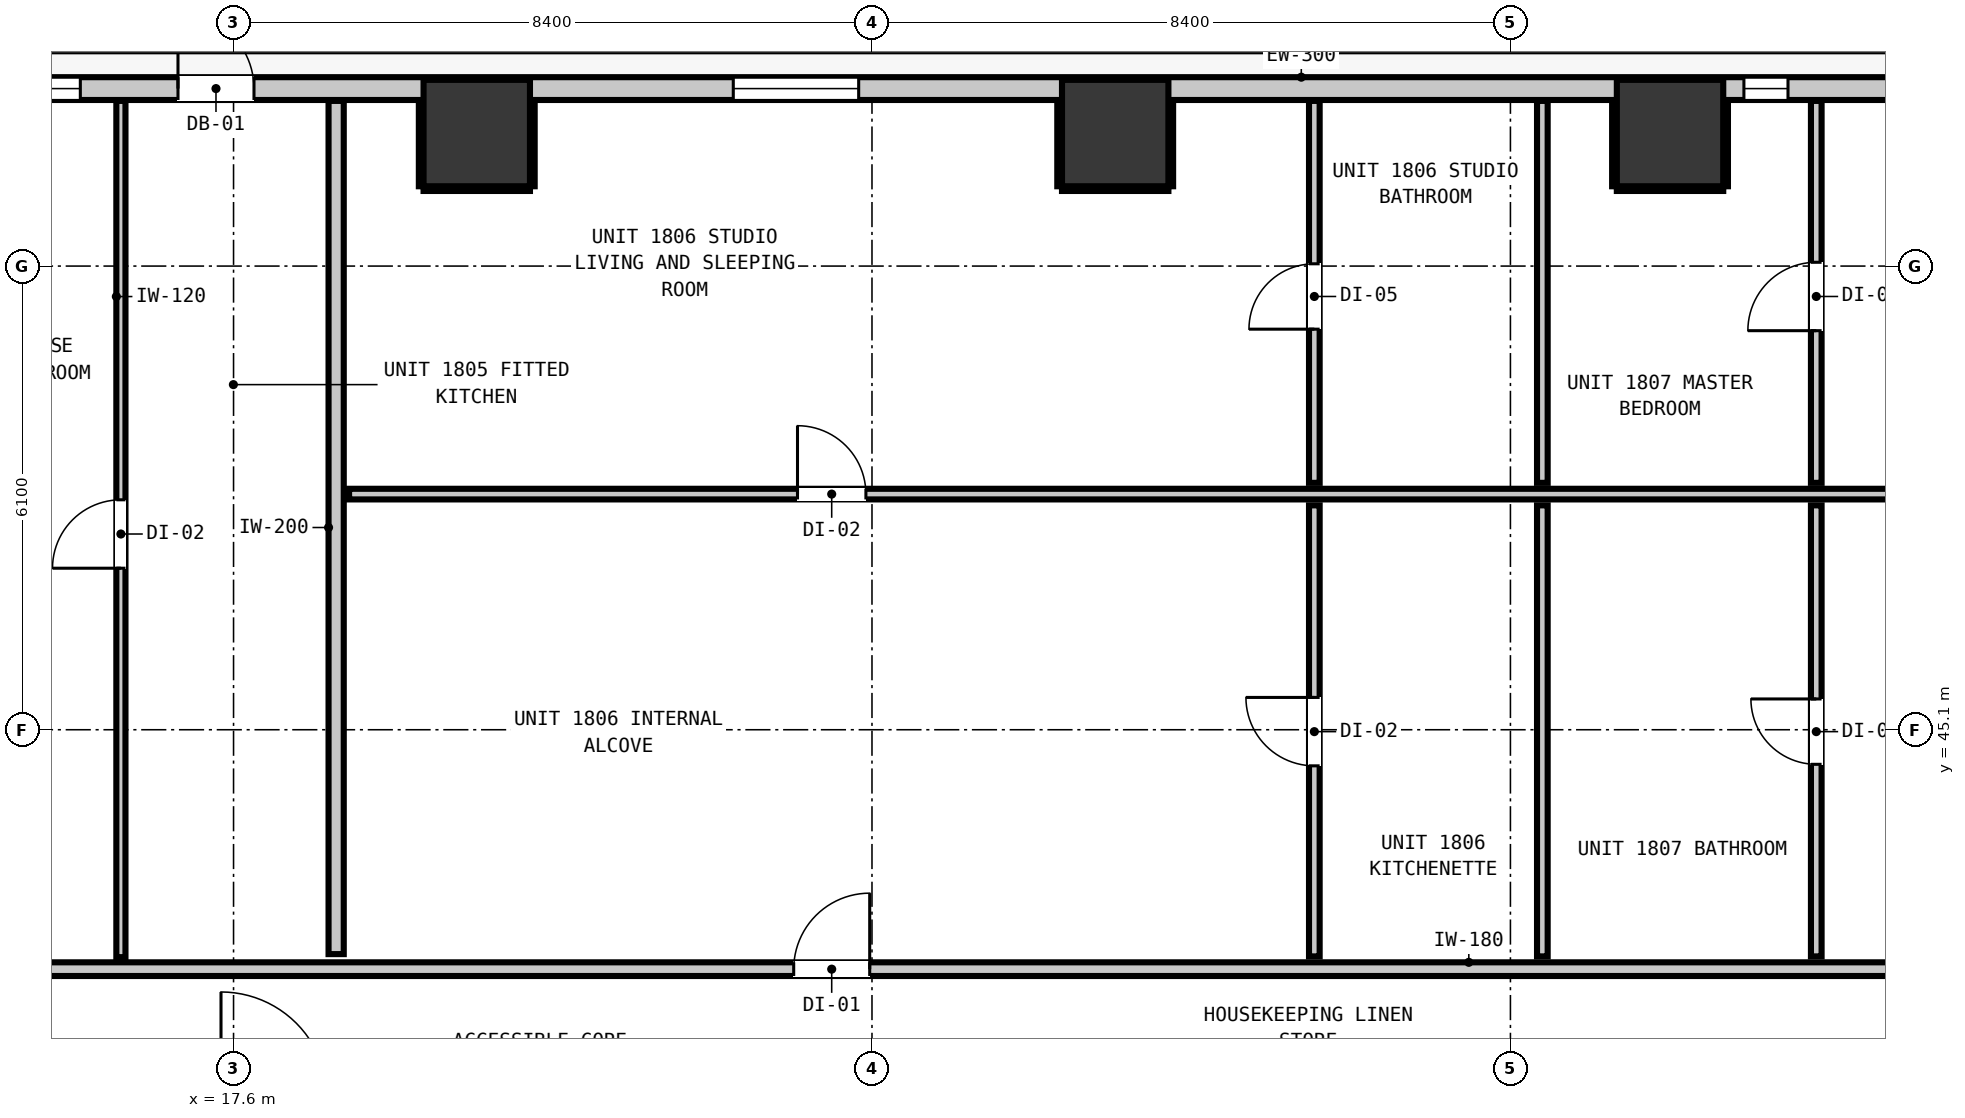
"""IFC4 building model, lengths in metres.
Left out: names, types, materials, properties, quantities, classifications, styles, units other than length and angle.
Written with IfcOpenShell. Run it as: python <this file> out.ifc"""

import sys

from ifc_helpers import new_model, si_unit, direction, frame, frame_2d, origin, origin_2d, place, context, subcontext, project, spatial, rectangle, extrude, element, fill, save


model = new_model("IFC4")
c1 = context("Model", 3, precision=1e-05, world=origin(), true_north=direction((0.0, 1.0)))
c2 = subcontext(c1, "Body", "Model", "MODEL_VIEW")
j1 = project(units=[si_unit("LENGTHUNIT", "METRE"), si_unit("PLANEANGLEUNIT", "RADIAN")], contexts=[c1])
p1 = place(None, origin())
s1 = spatial("IfcSite", under=j1, at=p1, CompositionType="ELEMENT")
p2 = place(p1, origin())
s2 = spatial("IfcBuilding", under=s1, at=p2, CompositionType="ELEMENT")
p3 = place(p2, frame((0.0, 0.0, 65.16)))
s3 = spatial("IfcBuildingStorey", under=s2, at=p3, CompositionType="ELEMENT", Elevation=65.16)
for number, where, z_axis, x_axis in (
    (1, (20.8, 52.95, 0.0), (0.0, 0.0, 1.0), (1.0, 0.0, 0.0)),
    (2, (29.2, 52.95, 0.0), (0.0, 0.0, 1.0), (1.0, 0.0, 0.0)),
    (3, (36.5, 52.95, 0.0), (0.0, 0.0, 1.0), (1.0, 0.0, 0.0)),
):
    element("IfcColumn", number, at=place(p3, frame(where, z_axis=z_axis, x_axis=x_axis)), inside=s3, PredefinedType="COLUMN", context=c2, shape_type="SweptSolid", body=[
        extrude(rectangle(XDim=1.4, YDim=1.4, at=origin_2d()), origin(), (0.0, 0.0, 1.0), 3.32),
    ])
p4 = place(p3, frame((10.365, 53.535, 0.0), z_axis=(0.0, 0.0, 1.0), x_axis=(1.0, 0.0, 0.0)))
e4 = element("IfcWall", 4, at=p4, inside=s3, PredefinedType="STANDARD", context=c2, shape_type="SweptSolid", body=[
    extrude(rectangle(XDim=37.47, YDim=0.3, at=frame_2d((18.735, 0.0))), origin(), (0.0, 0.0, 1.0), 3.06),
])
p5 = place(p4, frame((6.504, 0.0, 0.0)))
e5 = element("IfcOpeningElement", 5, at=p5, cuts=e4, PredefinedType="OPENING", context=c2, shape_type="SweptSolid", body=[
    extrude(rectangle(XDim=1.0, YDim=2.15, at=frame_2d((0.5, 1.075))), frame((0.0, 0.16, 0.0), z_axis=(0.0, -1.0, 0.0), x_axis=(1.0, 0.0, 0.0)), (0.0, 0.0, 1.0), 0.32),
])
p6 = place(p4, frame((4.169, 0.0, 0.85)))
e6 = element("IfcOpeningElement", 6, at=p6, cuts=e4, PredefinedType="OPENING", context=c2, shape_type="SweptSolid", body=[
    extrude(rectangle(XDim=1.05, YDim=1.65, at=frame_2d((0.525, 0.825))), frame((0.0, 0.16, 0.0), z_axis=(0.0, -1.0, 0.0), x_axis=(1.0, 0.0, 0.0)), (0.0, 0.0, 1.0), 0.32),
])
p7 = place(p4, frame((13.81, 0.0, 0.85)))
e7 = element("IfcOpeningElement", 7, at=p7, cuts=e4, PredefinedType="OPENING", context=c2, shape_type="SweptSolid", body=[
    extrude(rectangle(XDim=1.65, YDim=1.75, at=frame_2d((0.825, 0.875))), frame((0.0, 0.16, 0.0), z_axis=(0.0, -1.0, 0.0), x_axis=(1.0, 0.0, 0.0)), (0.0, 0.0, 1.0), 0.32),
])
p8 = place(p4, frame((31.046, 0.0, 0.85)))
e8 = element("IfcOpeningElement", 8, at=p8, cuts=e4, PredefinedType="OPENING", context=c2, shape_type="SweptSolid", body=[
    extrude(rectangle(XDim=1.65, YDim=1.75, at=frame_2d((0.825, 0.875))), frame((0.0, 0.16, 0.0), z_axis=(0.0, -1.0, 0.0), x_axis=(1.0, 0.0, 0.0)), (0.0, 0.0, 1.0), 0.32),
])
p9 = place(p4, frame((27.107, 0.0, 0.85)))
e9 = element("IfcOpeningElement", 9, at=p9, cuts=e4, PredefinedType="OPENING", context=c2, shape_type="SweptSolid", body=[
    extrude(rectangle(XDim=0.58, YDim=1.5, at=frame_2d((0.29, 0.75))), frame((0.0, 0.16, 0.0), z_axis=(0.0, -1.0, 0.0), x_axis=(1.0, 0.0, 0.0)), (0.0, 0.0, 1.0), 0.32),
])
p10 = place(p4, frame((36.056, 0.0, 0.85)))
e10 = element("IfcOpeningElement", 10, at=p10, cuts=e4, PredefinedType="OPENING", context=c2, shape_type="SweptSolid", body=[
    extrude(rectangle(XDim=1.05, YDim=1.65, at=frame_2d((0.525, 0.825))), frame((0.0, 0.16, 0.0), z_axis=(0.0, -1.0, 0.0), x_axis=(1.0, 0.0, 0.0)), (0.0, 0.0, 1.0), 0.32),
])
p11 = place(p3, frame((8.027, 41.95, 0.0), z_axis=(0.0, 0.0, 1.0), x_axis=(1.0, 0.0, 0.0)))
e11 = element("IfcWall", 11, at=p11, inside=s3, PredefinedType="PARTITIONING", context=c2, shape_type="SweptSolid", body=[
    extrude(rectangle(XDim=42.146, YDim=0.18, at=frame_2d((21.073, 0.0))), origin(), (0.0, 0.0, 1.0), 3.06),
])
p12 = place(p11, frame((5.255, 0.0, 0.0)))
e12 = element("IfcOpeningElement", 12, at=p12, cuts=e11, PredefinedType="OPENING", context=c2, shape_type="SweptSolid", body=[
    extrude(rectangle(XDim=1.0, YDim=2.15, at=frame_2d((0.5, 1.075))), frame((0.0, 0.1, 0.0), z_axis=(0.0, -1.0, 0.0), x_axis=(1.0, 0.0, 0.0)), (0.0, 0.0, 1.0), 0.2),
])
p13 = place(p11, frame((16.943, 0.0, 0.0)))
e13 = element("IfcOpeningElement", 13, at=p13, cuts=e11, PredefinedType="OPENING", context=c2, shape_type="SweptSolid", body=[
    extrude(rectangle(XDim=1.0, YDim=2.15, at=frame_2d((0.5, 1.075))), frame((0.0, 0.1, 0.0), z_axis=(0.0, -1.0, 0.0), x_axis=(1.0, 0.0, 0.0)), (0.0, 0.0, 1.0), 0.2),
])
p14 = place(p11, frame((33.708, 0.0, 0.0)))
e14 = element("IfcOpeningElement", 14, at=p14, cuts=e11, PredefinedType="OPENING", context=c2, shape_type="SweptSolid", body=[
    extrude(rectangle(XDim=1.0, YDim=2.15, at=frame_2d((0.5, 1.075))), frame((0.0, 0.1, 0.0), z_axis=(0.0, -1.0, 0.0), x_axis=(1.0, 0.0, 0.0)), (0.0, 0.0, 1.0), 0.2),
])
p15 = place(p3, frame((19.12, 48.2, 0.0), z_axis=(0.0, 0.0, 1.0), x_axis=(1.0, 0.0, 0.0)))
e15 = element("IfcWall", 15, at=p15, inside=s3, PredefinedType="PARTITIONING", context=c2, shape_type="SweptSolid", body=[
    extrude(rectangle(XDim=31.053, YDim=0.14, at=frame_2d((15.526, 0.0))), origin(), (0.0, 0.0, 1.0), 3.06),
])
p16 = place(p15, frame((5.9, 0.0, 0.0)))
e16 = element("IfcOpeningElement", 16, at=p16, cuts=e15, PredefinedType="OPENING", context=c2, shape_type="SweptSolid", body=[
    extrude(rectangle(XDim=0.9, YDim=2.1, at=frame_2d((0.45, 1.05))), frame((0.0, 0.08, 0.0), z_axis=(0.0, -1.0, 0.0), x_axis=(1.0, 0.0, 0.0)), (0.0, 0.0, 1.0), 0.16),
])
p17 = place(p15, frame((22.665, 0.0, 0.0)))
e17 = element("IfcOpeningElement", 17, at=p17, cuts=e15, PredefinedType="OPENING", context=c2, shape_type="SweptSolid", body=[
    extrude(rectangle(XDim=0.9, YDim=2.1, at=frame_2d((0.45, 1.05))), frame((0.0, 0.08, 0.0), z_axis=(0.0, -1.0, 0.0), x_axis=(1.0, 0.0, 0.0)), (0.0, 0.0, 1.0), 0.16),
])
p18 = place(p3, frame((18.95, 42.148, 0.0), z_axis=(0.0, 0.0, 1.0), x_axis=(0.0, 1.0, 0.0)))
e18 = element("IfcWall", 18, at=p18, inside=s3, PredefinedType="PARTITIONING", context=c2, shape_type="SweptSolid", body=[
    extrude(rectangle(XDim=11.225, YDim=0.2, at=frame_2d((5.613, 0.0))), origin(), (0.0, 0.0, 1.0), 3.06),
])
p19 = place(p3, frame((31.82, 42.118, 0.0), z_axis=(0.0, 0.0, 1.0), x_axis=(0.0, 1.0, 0.0)))
e19 = element("IfcWall", 19, at=p19, inside=s3, PredefinedType="PARTITIONING", context=c2, shape_type="SweptSolid", body=[
    extrude(rectangle(XDim=5.934, YDim=0.14, at=frame_2d((2.967, 0.0))), origin(), (0.0, 0.0, 1.0), 3.06),
])
p20 = place(p19, frame((2.507, 0.0, 0.0)))
e20 = element("IfcOpeningElement", 20, at=p20, cuts=e19, PredefinedType="OPENING", context=c2, shape_type="SweptSolid", body=[
    extrude(rectangle(XDim=0.9, YDim=2.1, at=frame_2d((0.45, 1.05))), frame((0.0, 0.08, 0.0), z_axis=(0.0, -1.0, 0.0), x_axis=(1.0, 0.0, 0.0)), (0.0, 0.0, 1.0), 0.16),
])
p21 = place(p3, frame((31.82, 48.348, 0.0), z_axis=(0.0, 0.0, 1.0), x_axis=(0.0, 1.0, 0.0)))
e21 = element("IfcWall", 21, at=p21, inside=s3, PredefinedType="PARTITIONING", context=c2, shape_type="SweptSolid", body=[
    extrude(rectangle(XDim=5.025, YDim=0.14, at=frame_2d((2.513, 0.0))), origin(), (0.0, 0.0, 1.0), 3.06),
])
p22 = place(p21, frame((2.022, 0.0, 0.0)))
e22 = element("IfcOpeningElement", 22, at=p22, cuts=e21, PredefinedType="OPENING", context=c2, shape_type="SweptSolid", body=[
    extrude(rectangle(XDim=0.86, YDim=2.02, at=frame_2d((0.43, 1.01))), frame((0.0, 0.08, 0.0), z_axis=(0.0, -1.0, 0.0), x_axis=(1.0, 0.0, 0.0)), (0.0, 0.0, 1.0), 0.16),
])
p23 = place(p3, frame((34.82, 42.118, 0.0), z_axis=(0.0, 0.0, 1.0), x_axis=(0.0, 1.0, 0.0)))
e23 = element("IfcWall", 23, at=p23, inside=s3, PredefinedType="PARTITIONING", context=c2, shape_type="SweptSolid", body=[
    extrude(rectangle(XDim=5.934, YDim=0.14, at=frame_2d((2.967, 0.0))), origin(), (0.0, 0.0, 1.0), 3.06),
])
p24 = place(p3, frame((34.82, 48.348, 0.0), z_axis=(0.0, 0.0, 1.0), x_axis=(0.0, 1.0, 0.0)))
e24 = element("IfcWall", 24, at=p24, inside=s3, PredefinedType="PARTITIONING", context=c2, shape_type="SweptSolid", body=[
    extrude(rectangle(XDim=5.025, YDim=0.14, at=frame_2d((2.513, 0.0))), origin(), (0.0, 0.0, 1.0), 3.06),
])
p25 = place(p3, frame((38.424, 42.118, 0.0), z_axis=(0.0, 0.0, 1.0), x_axis=(0.0, 1.0, 0.0)))
e25 = element("IfcWall", 25, at=p25, inside=s3, PredefinedType="PARTITIONING", context=c2, shape_type="SweptSolid", body=[
    extrude(rectangle(XDim=5.934, YDim=0.14, at=frame_2d((2.967, 0.0))), origin(), (0.0, 0.0, 1.0), 3.06),
])
p26 = place(p25, frame((2.527, 0.0, 0.0)))
e26 = element("IfcOpeningElement", 26, at=p26, cuts=e25, PredefinedType="OPENING", context=c2, shape_type="SweptSolid", body=[
    extrude(rectangle(XDim=0.86, YDim=2.02, at=frame_2d((0.43, 1.01))), frame((0.0, 0.08, 0.0), z_axis=(0.0, -1.0, 0.0), x_axis=(1.0, 0.0, 0.0)), (0.0, 0.0, 1.0), 0.16),
])
p27 = place(p3, frame((38.424, 48.348, 0.0), z_axis=(0.0, 0.0, 1.0), x_axis=(0.0, 1.0, 0.0)))
e27 = element("IfcWall", 27, at=p27, inside=s3, PredefinedType="PARTITIONING", context=c2, shape_type="SweptSolid", body=[
    extrude(rectangle(XDim=5.025, YDim=0.14, at=frame_2d((2.513, 0.0))), origin(), (0.0, 0.0, 1.0), 3.06),
])
p28 = place(p27, frame((2.002, 0.0, 0.0)))
e28 = element("IfcOpeningElement", 28, at=p28, cuts=e27, PredefinedType="OPENING", context=c2, shape_type="SweptSolid", body=[
    extrude(rectangle(XDim=0.9, YDim=2.1, at=frame_2d((0.45, 1.05))), frame((0.0, 0.08, 0.0), z_axis=(0.0, -1.0, 0.0), x_axis=(1.0, 0.0, 0.0)), (0.0, 0.0, 1.0), 0.16),
])
p29 = place(p3, frame((16.118, 42.108, 0.0), z_axis=(0.0, 0.0, 1.0), x_axis=(0.0, 1.0, 0.0)))
e29 = element("IfcWall", 29, at=p29, inside=s3, PredefinedType="PARTITIONING", context=c2, shape_type="SweptSolid", body=[
    extrude(rectangle(XDim=11.265, YDim=0.12, at=frame_2d((5.633, 0.0))), origin(), (0.0, 0.0, 1.0), 3.06),
])
p30 = place(p29, frame((5.117, 0.0, 0.0)))
e30 = element("IfcOpeningElement", 30, at=p30, cuts=e29, PredefinedType="OPENING", context=c2, shape_type="SweptSolid", body=[
    extrude(rectangle(XDim=0.9, YDim=2.1, at=frame_2d((0.45, 1.05))), frame((0.0, 0.07, 0.0), z_axis=(0.0, -1.0, 0.0), x_axis=(1.0, 0.0, 0.0)), (0.0, 0.0, 1.0), 0.14),
])
p31 = place(p3, frame((20.1, 52.218, 0.0), z_axis=(0.0, 0.0, 1.0), x_axis=(1.0, 0.0, 0.0)))
e31 = element("IfcWall", 31, at=p31, inside=s3, PredefinedType="PARTITIONING", context=c2, shape_type="SweptSolid", body=[
    extrude(rectangle(XDim=1.4, YDim=0.06, at=frame_2d((0.7, 0.0))), origin(), (0.0, 0.0, 1.0), 1.45),
])
for number, where, z_axis, x_axis in (
    (32, (20.068, 52.25, 0.0), (0.0, 0.0, 1.0), (0.0, 1.0, 0.0)),
    (33, (21.532, 52.25, 0.0), (0.0, 0.0, 1.0), (0.0, 1.0, 0.0)),
):
    element("IfcWall", number, at=place(p3, frame(where, z_axis=z_axis, x_axis=x_axis)), inside=s3, PredefinedType="PARTITIONING", context=c2, shape_type="SweptSolid", body=[
        extrude(rectangle(XDim=1.12, YDim=0.06, at=frame_2d((0.56, 0.0))), origin(), (0.0, 0.0, 1.0), 1.45),
    ])
p32 = place(p3, frame((28.5, 52.218, 0.0), z_axis=(0.0, 0.0, 1.0), x_axis=(1.0, 0.0, 0.0)))
e34 = element("IfcWall", 34, at=p32, inside=s3, PredefinedType="PARTITIONING", context=c2, shape_type="SweptSolid", body=[
    extrude(rectangle(XDim=1.4, YDim=0.06, at=frame_2d((0.7, 0.0))), origin(), (0.0, 0.0, 1.0), 1.45),
])
for number, where, z_axis, x_axis in (
    (35, (28.468, 52.25, 0.0), (0.0, 0.0, 1.0), (0.0, 1.0, 0.0)),
    (36, (29.932, 52.25, 0.0), (0.0, 0.0, 1.0), (0.0, 1.0, 0.0)),
):
    element("IfcWall", number, at=place(p3, frame(where, z_axis=z_axis, x_axis=x_axis)), inside=s3, PredefinedType="PARTITIONING", context=c2, shape_type="SweptSolid", body=[
        extrude(rectangle(XDim=1.12, YDim=0.06, at=frame_2d((0.56, 0.0))), origin(), (0.0, 0.0, 1.0), 1.45),
    ])
p33 = place(p3, frame((35.8, 52.218, 0.0), z_axis=(0.0, 0.0, 1.0), x_axis=(1.0, 0.0, 0.0)))
e37 = element("IfcWall", 37, at=p33, inside=s3, PredefinedType="PARTITIONING", context=c2, shape_type="SweptSolid", body=[
    extrude(rectangle(XDim=1.4, YDim=0.06, at=frame_2d((0.7, 0.0))), origin(), (0.0, 0.0, 1.0), 1.45),
])
for number, where, z_axis, x_axis in (
    (38, (35.768, 52.25, 0.0), (0.0, 0.0, 1.0), (0.0, 1.0, 0.0)),
    (39, (37.232, 52.25, 0.0), (0.0, 0.0, 1.0), (0.0, 1.0, 0.0)),
):
    element("IfcWall", number, at=place(p3, frame(where, z_axis=z_axis, x_axis=x_axis)), inside=s3, PredefinedType="PARTITIONING", context=c2, shape_type="SweptSolid", body=[
        extrude(rectangle(XDim=1.12, YDim=0.06, at=frame_2d((0.56, 0.0))), origin(), (0.0, 0.0, 1.0), 1.45),
    ])
p34 = place(p5, origin())
e40 = element("IfcDoor", 40, at=p34, inside=s3, OperationType="SINGLE_SWING_LEFT", PredefinedType="DOOR", context=c2, shape_type="SweptSolid", body=[
    extrude(rectangle(XDim=1.0, YDim=2.15, at=frame_2d((0.5, 1.075))), frame((0.0, 0.025, 0.0), z_axis=(0.0, -1.0, 0.0), x_axis=(1.0, 0.0, 0.0)), (0.0, 0.0, 1.0), 0.05),
])
fill(e5, e40)
p35 = place(p6, origin())
e41 = element("IfcWindow", 41, at=p35, inside=s3, PartitioningType="SINGLE_PANEL", PredefinedType="WINDOW", context=c2, shape_type="SweptSolid", body=[
    extrude(rectangle(XDim=1.05, YDim=1.65, at=frame_2d((0.525, 0.825))), frame((0.0, 0.03, 0.0), z_axis=(0.0, -1.0, 0.0), x_axis=(1.0, 0.0, 0.0)), (0.0, 0.0, 1.0), 0.06),
])
fill(e6, e41)
p36 = place(p7, origin())
e42 = element("IfcWindow", 42, at=p36, inside=s3, PartitioningType="SINGLE_PANEL", PredefinedType="WINDOW", context=c2, shape_type="SweptSolid", body=[
    extrude(rectangle(XDim=1.65, YDim=1.75, at=frame_2d((0.825, 0.875))), frame((0.0, 0.03, 0.0), z_axis=(0.0, -1.0, 0.0), x_axis=(1.0, 0.0, 0.0)), (0.0, 0.0, 1.0), 0.06),
])
fill(e7, e42)
p37 = place(p9, origin())
e43 = element("IfcWindow", 43, at=p37, inside=s3, PartitioningType="SINGLE_PANEL", PredefinedType="WINDOW", context=c2, shape_type="SweptSolid", body=[
    extrude(rectangle(XDim=0.58, YDim=1.5, at=frame_2d((0.29, 0.75))), frame((0.0, 0.03, 0.0), z_axis=(0.0, -1.0, 0.0), x_axis=(1.0, 0.0, 0.0)), (0.0, 0.0, 1.0), 0.06),
])
fill(e9, e43)
p38 = place(p30, origin())
e44 = element("IfcDoor", 44, at=p38, inside=s3, OperationType="SINGLE_SWING_LEFT", PredefinedType="DOOR", context=c2, shape_type="SweptSolid", body=[
    extrude(rectangle(XDim=0.9, YDim=2.1, at=frame_2d((0.45, 1.05))), frame((0.0, 0.025, 0.0), z_axis=(0.0, -1.0, 0.0), x_axis=(1.0, 0.0, 0.0)), (0.0, 0.0, 1.0), 0.05),
])
fill(e30, e44)
p39 = place(p13, origin())
e45 = element("IfcDoor", 45, at=p39, inside=s3, OperationType="SINGLE_SWING_RIGHT", PredefinedType="DOOR", context=c2, shape_type="SweptSolid", body=[
    extrude(rectangle(XDim=1.0, YDim=2.15, at=frame_2d((0.5, 1.075))), frame((0.0, 0.025, 0.0), z_axis=(0.0, -1.0, 0.0), x_axis=(1.0, 0.0, 0.0)), (0.0, 0.0, 1.0), 0.05),
])
fill(e13, e45)
p40 = place(p16, origin())
e46 = element("IfcDoor", 46, at=p40, inside=s3, OperationType="SINGLE_SWING_LEFT", PredefinedType="DOOR", context=c2, shape_type="SweptSolid", body=[
    extrude(rectangle(XDim=0.9, YDim=2.1, at=frame_2d((0.45, 1.05))), frame((0.0, 0.025, 0.0), z_axis=(0.0, -1.0, 0.0), x_axis=(1.0, 0.0, 0.0)), (0.0, 0.0, 1.0), 0.05),
])
fill(e16, e46)
p41 = place(p20, origin())
e47 = element("IfcDoor", 47, at=p41, inside=s3, OperationType="SINGLE_SWING_RIGHT", PredefinedType="DOOR", context=c2, shape_type="SweptSolid", body=[
    extrude(rectangle(XDim=0.9, YDim=2.1, at=frame_2d((0.45, 1.05))), frame((0.0, 0.025, 0.0), z_axis=(0.0, -1.0, 0.0), x_axis=(1.0, 0.0, 0.0)), (0.0, 0.0, 1.0), 0.05),
])
fill(e20, e47)
p42 = place(p22, origin())
e48 = element("IfcDoor", 48, at=p42, inside=s3, OperationType="SINGLE_SWING_LEFT", PredefinedType="DOOR", context=c2, shape_type="SweptSolid", body=[
    extrude(rectangle(XDim=0.86, YDim=2.02, at=frame_2d((0.43, 1.01))), frame((0.0, 0.025, 0.0), z_axis=(0.0, -1.0, 0.0), x_axis=(1.0, 0.0, 0.0)), (0.0, 0.0, 1.0), 0.05),
])
fill(e22, e48)
p43 = place(p26, origin())
e49 = element("IfcDoor", 49, at=p43, inside=s3, OperationType="SINGLE_SWING_RIGHT", PredefinedType="DOOR", context=c2, shape_type="SweptSolid", body=[
    extrude(rectangle(XDim=0.86, YDim=2.02, at=frame_2d((0.43, 1.01))), frame((0.0, 0.025, 0.0), z_axis=(0.0, -1.0, 0.0), x_axis=(1.0, 0.0, 0.0)), (0.0, 0.0, 1.0), 0.05),
])
fill(e26, e49)
p44 = place(p28, origin())
e50 = element("IfcDoor", 50, at=p44, inside=s3, OperationType="SINGLE_SWING_LEFT", PredefinedType="DOOR", context=c2, shape_type="SweptSolid", body=[
    extrude(rectangle(XDim=0.9, YDim=2.1, at=frame_2d((0.45, 1.05))), frame((0.0, 0.025, 0.0), z_axis=(0.0, -1.0, 0.0), x_axis=(1.0, 0.0, 0.0)), (0.0, 0.0, 1.0), 0.05),
])
fill(e28, e50)
save(model, sys.argv[1])
